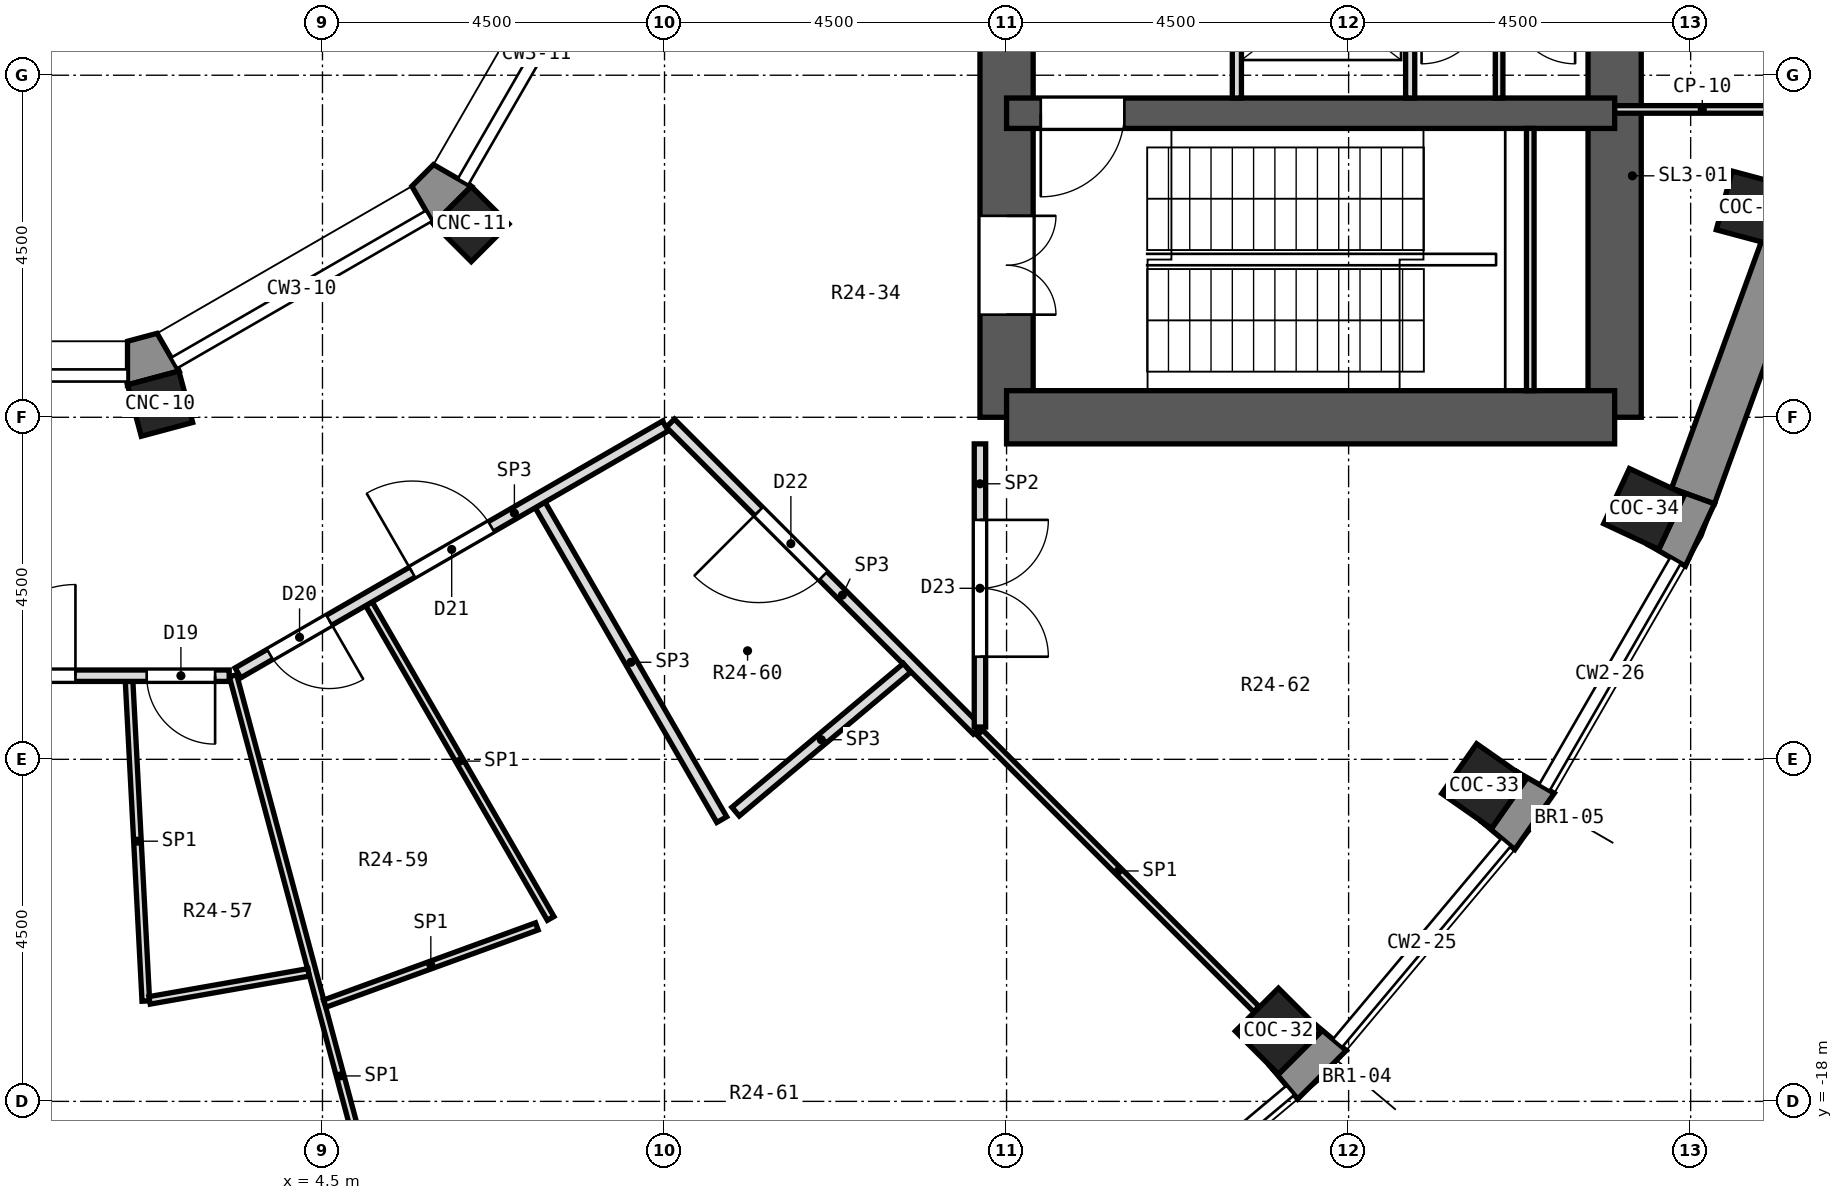
"""IFC4 building model, lengths in metres.
Left out: names, types, materials, properties, quantities, classifications, styles, units other than length and angle.
Written with IfcOpenShell. Run it as: python <this file> out.ifc"""

import sys

from ifc_helpers import new_model, si_unit, direction, frame, frame_2d, origin, origin_2d, place, context, subcontext, project, spatial, polyline, rectangle, outline, extrude, element, fill, save


model = new_model("IFC4")
c1 = context("Model", 3, precision=1e-05, world=origin(), true_north=direction((0.0, 1.0)))
c2 = subcontext(c1, "Body", "Model", "MODEL_VIEW")
j1 = project(units=[si_unit("LENGTHUNIT", "METRE"), si_unit("PLANEANGLEUNIT", "RADIAN")], contexts=[c1])
p1 = place(None, origin())
s1 = spatial("IfcSite", under=j1, at=p1, CompositionType="ELEMENT")
p2 = place(p1, origin())
s2 = spatial("IfcBuilding", under=s1, at=p2, CompositionType="ELEMENT")
p3 = place(p2, frame((0.0, 0.0, 155.8)))
s3 = spatial("IfcBuildingStorey", under=s2, at=p3, CompositionType="ELEMENT", Elevation=155.8)
for number, where, z_axis, x_axis in (
    (1, (17.077, -17.077, -0.55), (0.0, 0.0, 1.0), (0.707, -0.707, 0.0)),
    (2, (19.782, -13.852, -0.55), (0.0, 0.0, 1.0), (0.819, -0.574, 0.0)),
    (3, (21.887, -10.206, -0.55), (0.0, 0.0, 1.0), (0.906, -0.423, 0.0)),
    (4, (23.327, -6.25, -0.55), (0.0, 0.0, 1.0), (0.966, -0.259, 0.0)),
):
    element("IfcColumn", number, at=place(p3, frame(where, z_axis=z_axis, x_axis=x_axis)), inside=s3, PredefinedType="COLUMN", context=c2, shape_type="SweptSolid", body=[
        extrude(rectangle(XDim=0.8, YDim=0.8, at=origin_2d()), origin(), (0.0, 0.0, 1.0), 5.55),
    ])
for number, where, z_axis, x_axis in (
    (5, (2.364, -8.821, 0.0), (0.0, 0.0, 1.0), (0.259, -0.966, 0.0)),
    (6, (6.458, -6.458, 0.0), (0.0, 0.0, 1.0), (0.707, -0.707, 0.0)),
):
    element("IfcColumn", number, at=place(p3, frame(where, z_axis=z_axis, x_axis=x_axis)), inside=s3, PredefinedType="COLUMN", context=c2, shape_type="SweptSolid", body=[
        extrude(rectangle(XDim=0.7, YDim=0.7, at=origin_2d()), origin(), (0.0, 0.0, 1.0), 5.0),
    ])
p4 = place(p3, frame((13.5, -9.0, 0.0), z_axis=(0.0, 0.0, 1.0), x_axis=(0.0, 1.0, 0.0)))
e7 = element("IfcWall", 7, at=p4, inside=s3, PredefinedType="SHEAR", context=c2, shape_type="SweptSolid", body=[
    extrude(rectangle(XDim=18.0, YDim=0.7, at=frame_2d((9.0, 0.0))), origin(), (0.0, 0.0, 1.0), 5.0),
])
p5 = place(p4, frame((15.35, 0.0, 0.0)))
e8 = element("IfcOpeningElement", 8, at=p5, cuts=e7, PredefinedType="OPENING", context=c2, shape_type="SweptSolid", body=[
    extrude(rectangle(XDim=1.3, YDim=2.1, at=frame_2d((0.65, 1.05))), frame((0.0, 0.362, 0.0), z_axis=(0.0, -1.0, 0.0), x_axis=(1.0, 0.0, 0.0)), (0.0, 0.0, 1.0), 0.724),
])
p6 = place(p4, frame((1.35, 0.0, 0.0)))
e9 = element("IfcOpeningElement", 9, at=p6, cuts=e7, PredefinedType="OPENING", context=c2, shape_type="SweptSolid", body=[
    extrude(rectangle(XDim=1.3, YDim=2.1, at=frame_2d((0.65, 1.05))), frame((0.0, 0.362, 0.0), z_axis=(0.0, -1.0, 0.0), x_axis=(1.0, 0.0, 0.0)), (0.0, 0.0, 1.0), 0.724),
])
p7 = place(p4, frame((7.5, 0.0, 0.0)))
e10 = element("IfcOpeningElement", 10, at=p7, cuts=e7, PredefinedType="OPENING", context=c2, shape_type="SweptSolid", body=[
    extrude(rectangle(XDim=3.0, YDim=2.4, at=frame_2d((1.5, 1.2))), frame((0.0, 0.362, 0.0), z_axis=(0.0, -1.0, 0.0), x_axis=(1.0, 0.0, 0.0)), (0.0, 0.0, 1.0), 0.724),
])
p8 = place(p3, frame((21.5, -9.0, 0.0), z_axis=(0.0, 0.0, 1.0), x_axis=(0.0, 1.0, 0.0)))
e11 = element("IfcWall", 11, at=p8, inside=s3, PredefinedType="SHEAR", context=c2, shape_type="SweptSolid", body=[
    extrude(rectangle(XDim=18.0, YDim=0.7, at=frame_2d((9.0, 0.0))), origin(), (0.0, 0.0, 1.0), 5.0),
])
p9 = place(p8, frame((9.45, 0.0, 0.0)))
e12 = element("IfcOpeningElement", 12, at=p9, cuts=e11, PredefinedType="OPENING", context=c2, shape_type="SweptSolid", body=[
    extrude(rectangle(XDim=0.9, YDim=2.1, at=frame_2d((0.45, 1.05))), frame((0.0, 0.362, 0.0), z_axis=(0.0, -1.0, 0.0), x_axis=(1.0, 0.0, 0.0)), (0.0, 0.0, 1.0), 0.724),
])
p10 = place(p8, frame((7.65, 0.0, 0.0)))
e13 = element("IfcOpeningElement", 13, at=p10, cuts=e11, PredefinedType="OPENING", context=c2, shape_type="SweptSolid", body=[
    extrude(rectangle(XDim=0.9, YDim=2.1, at=frame_2d((0.45, 1.05))), frame((0.0, 0.362, 0.0), z_axis=(0.0, -1.0, 0.0), x_axis=(1.0, 0.0, 0.0)), (0.0, 0.0, 1.0), 0.724),
])
p11 = place(p3, frame((13.5, -9.0, 0.0), z_axis=(0.0, 0.0, 1.0), x_axis=(1.0, 0.0, 0.0)))
e14 = element("IfcWall", 14, at=p11, inside=s3, PredefinedType="SHEAR", context=c2, shape_type="SweptSolid", body=[
    extrude(rectangle(XDim=8.0, YDim=0.7, at=frame_2d((4.0, 0.0))), origin(), (0.0, 0.0, 1.0), 5.0),
])
p12 = place(p3, frame((13.5, -5.0, 0.0), z_axis=(0.0, 0.0, 1.0), x_axis=(1.0, 0.0, 0.0)))
e15 = element("IfcWall", 15, at=p12, inside=s3, PredefinedType="SHEAR", context=c2, shape_type="SweptSolid", body=[
    extrude(rectangle(XDim=8.0, YDim=0.4, at=frame_2d((4.0, 0.0))), origin(), (0.0, 0.0, 1.0), 5.0),
])
p13 = place(p12, frame((0.45, 0.0, 0.0)))
e16 = element("IfcOpeningElement", 16, at=p13, cuts=e15, PredefinedType="OPENING", context=c2, shape_type="SweptSolid", body=[
    extrude(rectangle(XDim=1.1, YDim=2.1, at=frame_2d((0.55, 1.05))), frame((0.0, 0.212, 0.0), z_axis=(0.0, -1.0, 0.0), x_axis=(1.0, 0.0, 0.0)), (0.0, 0.0, 1.0), 0.424),
])
p14 = place(p3, frame((22.531, -10.036, 0.0), z_axis=(0.0, 0.0, 1.0), x_axis=(0.342032843455, 0.93968799822, 0.0)))
e17 = element("IfcWall", 17, at=p14, inside=s3, PredefinedType="SOLIDWALL", context=c2, shape_type="SweptSolid", body=[
    extrude(rectangle(XDim=3.45, YDim=0.6, at=frame_2d((1.725, 0.0))), origin(), (0.0, 0.0, 1.0), 4.55),
])
p15 = place(p3, origin())
e18 = element("IfcWall", 18, at=p15, inside=s3, PredefinedType="SOLIDWALL", context=c2, shape_type="SweptSolid", body=[
    extrude(outline(polyline([(17.969, -17.33), (17.51, -16.944), (17.642, -17.077), (17.077, -17.642), (16.944, -17.51), (17.33, -17.969), (17.969, -17.33)])), origin(), (0.0, 0.0, 1.0), 4.55),
])
p16 = place(p3, origin())
e19 = element("IfcWall", 19, at=p16, inside=s3, PredefinedType="SOLIDWALL", context=c2, shape_type="SweptSolid", body=[
    extrude(outline(polyline([(20.187, -14.687), (20.706, -13.946), (20.186, -13.646), (20.34, -13.754), (19.881, -14.409), (19.727, -14.302), (20.187, -14.687)])), origin(), (0.0, 0.0, 1.0), 4.55),
])
p17 = place(p3, origin())
e20 = element("IfcWall", 20, at=p17, inside=s3, PredefinedType="SOLIDWALL", context=c2, shape_type="SweptSolid", body=[
    extrude(outline(polyline([(22.813, -10.139), (22.249, -9.934), (22.419, -10.013), (22.081, -10.738), (21.911, -10.659), (22.431, -10.959), (22.813, -10.139)])), origin(), (0.0, 0.0, 1.0), 4.55),
])
p18 = place(p3, origin())
e21 = element("IfcWall", 21, at=p18, inside=s3, PredefinedType="SOLIDWALL", context=c2, shape_type="SweptSolid", body=[
    extrude(outline(polyline([(24.227, -6.023), (23.636, -5.919), (23.817, -5.968), (23.61, -6.74), (23.429, -6.692), (23.993, -6.897), (24.227, -6.023)])), origin(), (0.0, 0.0, 1.0), 4.55),
])
p19 = place(p3, origin())
e22 = element("IfcWall", 22, at=p19, inside=s3, PredefinedType="SOLIDWALL", context=c2, shape_type="SweptSolid", body=[
    extrude(outline(polyline([(2.611, -8.392), (2.324, -7.896), (1.935, -8.0), (1.935, -8.573), (2.611, -8.392)])), origin(), (0.0, 0.0, 1.0), 4.55),
])
p20 = place(p3, origin())
e23 = element("IfcWall", 23, at=p20, inside=s3, PredefinedType="SOLIDWALL", context=c2, shape_type="SweptSolid", body=[
    extrude(outline(polyline([(5.962, -6.458), (6.458, -5.962), (5.961, -5.676), (5.676, -5.961), (5.962, -6.458)])), origin(), (0.0, 0.0, 1.0), 4.55),
])
p21 = place(p3, frame((1.956, -12.475, 0.0), z_axis=(0.0, 0.0, 1.0), x_axis=(0.052297124669, -0.998631569074, 0.0)))
e24 = element("IfcWall", 24, at=p21, inside=s3, PredefinedType="PARTITIONING", context=c2, shape_type="SweptSolid", body=[
    extrude(rectangle(XDim=4.211, YDim=0.1, at=frame_2d((2.105, 0.0))), origin(), (0.0, 0.0, 1.0), 4.55),
])
p22 = place(p3, frame((3.323, -12.4, 0.0), z_axis=(0.0, 0.0, 1.0), x_axis=(0.258724519119, -0.965951149493, 0.0)))
e25 = element("IfcWall", 25, at=p22, inside=s3, PredefinedType="PARTITIONING", context=c2, shape_type="SweptSolid", body=[
    extrude(rectangle(XDim=10.903, YDim=0.1, at=frame_2d((5.451, 0.0))), origin(), (0.0, 0.0, 1.0), 4.55),
])
p23 = place(p3, frame((5.112, -11.454, 0.0), z_axis=(0.0, 0.0, 1.0), x_axis=(0.500099733259, -0.865967815103, 0.0)))
e26 = element("IfcWall", 26, at=p23, inside=s3, PredefinedType="PARTITIONING", context=c2, shape_type="SweptSolid", body=[
    extrude(rectangle(XDim=4.78, YDim=0.1, at=frame_2d((2.39, 0.0))), origin(), (0.0, 0.0, 1.0), 4.55),
])
p24 = place(p3, frame((7.364, -10.153, 0.0), z_axis=(0.0, 0.0, 1.0), x_axis=(0.49988015136, -0.866094587373, 0.0)))
e27 = element("IfcWall", 27, at=p24, inside=s3, PredefinedType="PARTITIONING", context=c2, shape_type="SweptSolid", body=[
    extrude(rectangle(XDim=4.78, YDim=0.15, at=frame_2d((2.39, 0.0))), origin(), (0.0, 0.0, 1.0), 4.55),
])
p25 = place(p3, frame((13.15, -13.15, 0.0), z_axis=(0.0, 0.0, 1.0), x_axis=(0.707106781187, -0.707106781187, 0.0)))
e28 = element("IfcWall", 28, at=p25, inside=s3, PredefinedType="PARTITIONING", context=c2, shape_type="SweptSolid", body=[
    extrude(rectangle(XDim=5.143, YDim=0.1, at=frame_2d((2.572, 0.0))), origin(), (0.0, 0.0, 1.0), 4.55),
])
p26 = place(p3, frame((9.077, -9.077, 0.0), z_axis=(0.0, 0.0, 1.0), x_axis=(0.707106781187, -0.707106781187, 0.0)))
e29 = element("IfcWall", 29, at=p26, inside=s3, PredefinedType="PARTITIONING", context=c2, shape_type="SweptSolid", body=[
    extrude(rectangle(XDim=5.71, YDim=0.15, at=frame_2d((2.855, 0.0))), origin(), (0.0, 0.0, 1.0), 4.55),
])
p27 = place(p26, frame((1.642, 0.0, 0.0)))
e30 = element("IfcOpeningElement", 30, at=p27, cuts=e29, PredefinedType="OPENING", context=c2, shape_type="SweptSolid", body=[
    extrude(rectangle(XDim=1.2, YDim=2.1, at=frame_2d((0.6, 1.05))), frame((0.0, 0.087, 0.0), z_axis=(0.0, -1.0, 0.0), x_axis=(1.0, 0.0, 0.0)), (0.0, 0.0, 1.0), 0.174),
])
p28 = place(p3, frame((-3.248, -12.4, 0.0), z_axis=(0.0, 0.0, 1.0), x_axis=(1.0, 0.0, 0.0)))
e31 = element("IfcWall", 31, at=p28, inside=s3, PredefinedType="PARTITIONING", context=c2, shape_type="SweptSolid", body=[
    extrude(rectangle(XDim=6.521, YDim=0.15, at=frame_2d((3.26, 0.0))), origin(), (0.0, 0.0, 1.0), 4.55),
])
p29 = place(p28, frame((0.811, 0.0, 0.0)))
e32 = element("IfcOpeningElement", 32, at=p29, cuts=e31, PredefinedType="OPENING", context=c2, shape_type="SweptSolid", body=[
    extrude(rectangle(XDim=0.9, YDim=2.1, at=frame_2d((0.45, 1.05))), frame((0.0, 0.087, 0.0), z_axis=(0.0, -1.0, 0.0), x_axis=(1.0, 0.0, 0.0)), (0.0, 0.0, 1.0), 0.174),
])
p30 = place(p28, frame((3.298, 0.0, 0.0)))
e33 = element("IfcOpeningElement", 33, at=p30, cuts=e31, PredefinedType="OPENING", context=c2, shape_type="SweptSolid", body=[
    extrude(rectangle(XDim=1.2, YDim=2.1, at=frame_2d((0.6, 1.05))), frame((0.0, 0.087, 0.0), z_axis=(0.0, -1.0, 0.0), x_axis=(1.0, 0.0, 0.0)), (0.0, 0.0, 1.0), 0.174),
])
p31 = place(p28, frame((5.436, 0.0, 0.0)))
e34 = element("IfcOpeningElement", 34, at=p31, cuts=e31, PredefinedType="OPENING", context=c2, shape_type="SweptSolid", body=[
    extrude(rectangle(XDim=0.9, YDim=2.1, at=frame_2d((0.45, 1.05))), frame((0.0, 0.087, 0.0), z_axis=(0.0, -1.0, 0.0), x_axis=(1.0, 0.0, 0.0)), (0.0, 0.0, 1.0), 0.174),
])
p32 = place(p3, frame((2.225, -16.671, 0.0), z_axis=(0.0, 0.0, 1.0), x_axis=(0.984822876139, 0.173562388302, 0.0)))
e35 = element("IfcWall", 35, at=p32, inside=s3, PredefinedType="PARTITIONING", context=c2, shape_type="SweptSolid", body=[
    extrude(rectangle(XDim=2.124, YDim=0.1, at=frame_2d((1.062, 0.0))), origin(), (0.0, 0.0, 1.0), 4.55),
])
p33 = place(p3, frame((4.53, -16.714, 0.0), z_axis=(0.0, 0.0, 1.0), x_axis=(0.939651702054, 0.342132545699, 0.0)))
e36 = element("IfcWall", 36, at=p33, inside=s3, PredefinedType="PARTITIONING", context=c2, shape_type="SweptSolid", body=[
    extrude(rectangle(XDim=2.969, YDim=0.1, at=frame_2d((1.485, 0.0))), origin(), (0.0, 0.0, 1.0), 4.55),
])
p34 = place(p3, frame((3.388, -12.363, 0.0), z_axis=(0.0, 0.0, 1.0), x_axis=(0.865967095912, 0.5001009786, 0.0)))
e37 = element("IfcWall", 37, at=p34, inside=s3, PredefinedType="PARTITIONING", context=c2, shape_type="SweptSolid", body=[
    extrude(rectangle(XDim=6.495, YDim=0.15, at=frame_2d((3.248, 0.0))), origin(), (0.0, 0.0, 1.0), 4.55),
])
p35 = place(p34, frame((0.486, 0.0, 0.0)))
e38 = element("IfcOpeningElement", 38, at=p35, cuts=e37, PredefinedType="OPENING", context=c2, shape_type="SweptSolid", body=[
    extrude(rectangle(XDim=0.9, YDim=2.1, at=frame_2d((0.45, 1.05))), frame((0.0, 0.087, 0.0), z_axis=(0.0, -1.0, 0.0), x_axis=(1.0, 0.0, 0.0)), (0.0, 0.0, 1.0), 0.174),
])
p36 = place(p34, frame((2.647, 0.0, 0.0)))
e39 = element("IfcOpeningElement", 39, at=p36, cuts=e37, PredefinedType="OPENING", context=c2, shape_type="SweptSolid", body=[
    extrude(rectangle(XDim=1.2, YDim=2.1, at=frame_2d((0.6, 1.05))), frame((0.0, 0.087, 0.0), z_axis=(0.0, -1.0, 0.0), x_axis=(1.0, 0.0, 0.0)), (0.0, 0.0, 1.0), 0.174),
])
p37 = place(p3, frame((9.935, -14.188, 0.0), z_axis=(0.0, 0.0, 1.0), x_axis=(0.766150707514, 0.642660947448, 0.0)))
e40 = element("IfcWall", 40, at=p37, inside=s3, PredefinedType="PARTITIONING", context=c2, shape_type="SweptSolid", body=[
    extrude(rectangle(XDim=2.944, YDim=0.15, at=frame_2d((1.472, 0.0))), origin(), (0.0, 0.0, 1.0), 4.55),
])
p38 = place(p3, frame((13.15, -13.075, 0.0), z_axis=(0.0, 0.0, 1.0), x_axis=(0.0, 1.0, 0.0)))
e41 = element("IfcWall", 41, at=p38, inside=s3, PredefinedType="PARTITIONING", context=c2, shape_type="SweptSolid", body=[
    extrude(rectangle(XDim=3.725, YDim=0.15, at=frame_2d((1.862, 0.0))), origin(), (0.0, 0.0, 1.0), 4.55),
])
p39 = place(p38, frame((0.925, 0.0, 0.0)))
e42 = element("IfcOpeningElement", 42, at=p39, cuts=e41, PredefinedType="OPENING", context=c2, shape_type="SweptSolid", body=[
    extrude(rectangle(XDim=1.8, YDim=2.1, at=frame_2d((0.9, 1.05))), frame((0.0, 0.087, 0.0), z_axis=(0.0, -1.0, 0.0), x_axis=(1.0, 0.0, 0.0)), (0.0, 0.0, 1.0), 0.174),
])
p40 = place(p3, frame((21.5, -4.95, 0.0), z_axis=(0.0, 0.0, 1.0), x_axis=(1.0, 0.0, 0.0)))
e43 = element("IfcWall", 43, at=p40, inside=s3, PredefinedType="PARTITIONING", context=c2, shape_type="SweptSolid", body=[
    extrude(rectangle(XDim=2.307, YDim=0.1, at=frame_2d((1.153, 0.0))), origin(), (0.0, 0.0, 1.0), 4.55),
])
p41 = place(p3, frame((16.53, -4.8, 0.0), z_axis=(0.0, 0.0, 1.0), x_axis=(0.0, 1.0, 0.0)))
e44 = element("IfcWall", 44, at=p41, inside=s3, PredefinedType="PARTITIONING", context=c2, shape_type="SweptSolid", body=[
    extrude(rectangle(XDim=2.6, YDim=0.12, at=frame_2d((1.3, 0.0))), origin(), (0.0, 0.0, 1.0), 4.55),
])
p42 = place(p41, frame((0.75, 0.0, 0.0)))
e45 = element("IfcOpeningElement", 45, at=p42, cuts=e44, PredefinedType="OPENING", context=c2, shape_type="SweptSolid", body=[
    extrude(rectangle(XDim=1.1, YDim=2.1, at=frame_2d((0.55, 1.05))), frame((0.0, 0.072, 0.0), z_axis=(0.0, -1.0, 0.0), x_axis=(1.0, 0.0, 0.0)), (0.0, 0.0, 1.0), 0.144),
])
p43 = place(p3, frame((18.81, -4.8, 0.0), z_axis=(0.0, 0.0, 1.0), x_axis=(0.0, 1.0, 0.0)))
e46 = element("IfcWall", 46, at=p43, inside=s3, PredefinedType="PARTITIONING", context=c2, shape_type="SweptSolid", body=[
    extrude(rectangle(XDim=2.6, YDim=0.12, at=frame_2d((1.3, 0.0))), origin(), (0.0, 0.0, 1.0), 4.55),
])
p44 = place(p3, frame((19.98, -4.8, 0.0), z_axis=(0.0, 0.0, 1.0), x_axis=(0.0, 1.0, 0.0)))
e47 = element("IfcWall", 47, at=p44, inside=s3, PredefinedType="PARTITIONING", context=c2, shape_type="SweptSolid", body=[
    extrude(rectangle(XDim=2.6, YDim=0.1, at=frame_2d((1.3, 0.0))), origin(), (0.0, 0.0, 1.0), 4.55),
])
p45 = place(p3, frame((20.39, -8.65, 0.0), z_axis=(0.0, 0.0, 1.0), x_axis=(0.0, 1.0, 0.0)))
e48 = element("IfcWall", 48, at=p45, inside=s3, PredefinedType="PARTITIONING", context=c2, shape_type="SweptSolid", body=[
    extrude(rectangle(XDim=3.45, YDim=0.1, at=frame_2d((1.725, 0.0))), origin(), (0.0, 0.0, 1.0), 4.55),
])
p46 = place(p30, origin())
e49 = element("IfcDoor", 49, at=p46, inside=s3, OperationType="SINGLE_SWING_RIGHT", PredefinedType="DOOR", context=c2, shape_type="SweptSolid", body=[
    extrude(rectangle(XDim=1.2, YDim=2.1, at=frame_2d((0.6, 1.05))), frame((0.0, 0.025, 0.0), z_axis=(0.0, -1.0, 0.0), x_axis=(1.0, 0.0, 0.0)), (0.0, 0.0, 1.0), 0.05),
])
fill(e33, e49)
p47 = place(p31, frame((0.9, 0.0, 0.0), z_axis=(0.0, 0.0, 1.0), x_axis=(-1.0, 0.0, 0.0)))
e50 = element("IfcDoor", 50, at=p47, inside=s3, OperationType="SINGLE_SWING_LEFT", PredefinedType="DOOR", context=c2, shape_type="SweptSolid", body=[
    extrude(rectangle(XDim=0.9, YDim=2.1, at=frame_2d((0.45, 1.05))), frame((0.0, 0.025, 0.0), z_axis=(0.0, -1.0, 0.0), x_axis=(1.0, 0.0, 0.0)), (0.0, 0.0, 1.0), 0.05),
])
fill(e34, e50)
p48 = place(p35, frame((0.9, 0.0, 0.0), z_axis=(0.0, 0.0, 1.0), x_axis=(-1.0, 0.0, 0.0)))
e51 = element("IfcDoor", 51, at=p48, inside=s3, OperationType="SINGLE_SWING_LEFT", PredefinedType="DOOR", context=c2, shape_type="SweptSolid", body=[
    extrude(rectangle(XDim=0.9, YDim=2.1, at=frame_2d((0.45, 1.05))), frame((0.0, 0.025, 0.0), z_axis=(0.0, -1.0, 0.0), x_axis=(1.0, 0.0, 0.0)), (0.0, 0.0, 1.0), 0.05),
])
fill(e38, e51)
p49 = place(p36, origin())
e52 = element("IfcDoor", 52, at=p49, inside=s3, OperationType="SINGLE_SWING_LEFT", PredefinedType="DOOR", context=c2, shape_type="SweptSolid", body=[
    extrude(rectangle(XDim=1.2, YDim=2.1, at=frame_2d((0.6, 1.05))), frame((0.0, 0.025, 0.0), z_axis=(0.0, -1.0, 0.0), x_axis=(1.0, 0.0, 0.0)), (0.0, 0.0, 1.0), 0.05),
])
fill(e39, e52)
p50 = place(p27, frame((1.2, 0.0, 0.0), z_axis=(0.0, 0.0, 1.0), x_axis=(-1.0, 0.0, 0.0)))
e53 = element("IfcDoor", 53, at=p50, inside=s3, OperationType="SINGLE_SWING_RIGHT", PredefinedType="DOOR", context=c2, shape_type="SweptSolid", body=[
    extrude(rectangle(XDim=1.2, YDim=2.1, at=frame_2d((0.6, 1.05))), frame((0.0, 0.025, 0.0), z_axis=(0.0, -1.0, 0.0), x_axis=(1.0, 0.0, 0.0)), (0.0, 0.0, 1.0), 0.05),
])
fill(e30, e53)
p51 = place(p39, frame((1.8, 0.0, 0.0), z_axis=(0.0, 0.0, 1.0), x_axis=(-1.0, 0.0, 0.0)))
e54 = element("IfcDoor", 54, at=p51, inside=s3, OperationType="DOUBLE_DOOR_SINGLE_SWING", PredefinedType="DOOR", context=c2, shape_type="SweptSolid", body=[
    extrude(rectangle(XDim=1.8, YDim=2.1, at=frame_2d((0.9, 1.05))), frame((0.0, 0.025, 0.0), z_axis=(0.0, -1.0, 0.0), x_axis=(1.0, 0.0, 0.0)), (0.0, 0.0, 1.0), 0.05),
])
fill(e42, e54)
p52 = place(p13, frame((1.1, 0.0, 0.0), z_axis=(0.0, 0.0, 1.0), x_axis=(-1.0, 0.0, 0.0)))
e55 = element("IfcDoor", 55, at=p52, inside=s3, OperationType="SINGLE_SWING_RIGHT", PredefinedType="DOOR", context=c2, shape_type="SweptSolid", body=[
    extrude(rectangle(XDim=1.1, YDim=2.1, at=frame_2d((0.55, 1.05))), frame((0.0, 0.025, 0.0), z_axis=(0.0, -1.0, 0.0), x_axis=(1.0, 0.0, 0.0)), (0.0, 0.0, 1.0), 0.05),
])
fill(e16, e55)
p53 = place(p6, frame((1.3, 0.0, 0.0), z_axis=(0.0, 0.0, 1.0), x_axis=(-1.0, 0.0, 0.0)))
e56 = element("IfcDoor", 56, at=p53, inside=s3, OperationType="DOUBLE_DOOR_SINGLE_SWING", PredefinedType="DOOR", context=c2, shape_type="SweptSolid", body=[
    extrude(rectangle(XDim=1.3, YDim=2.1, at=frame_2d((0.65, 1.05))), frame((0.0, 0.025, 0.0), z_axis=(0.0, -1.0, 0.0), x_axis=(1.0, 0.0, 0.0)), (0.0, 0.0, 1.0), 0.05),
])
fill(e9, e56)
save(model, sys.argv[1])
